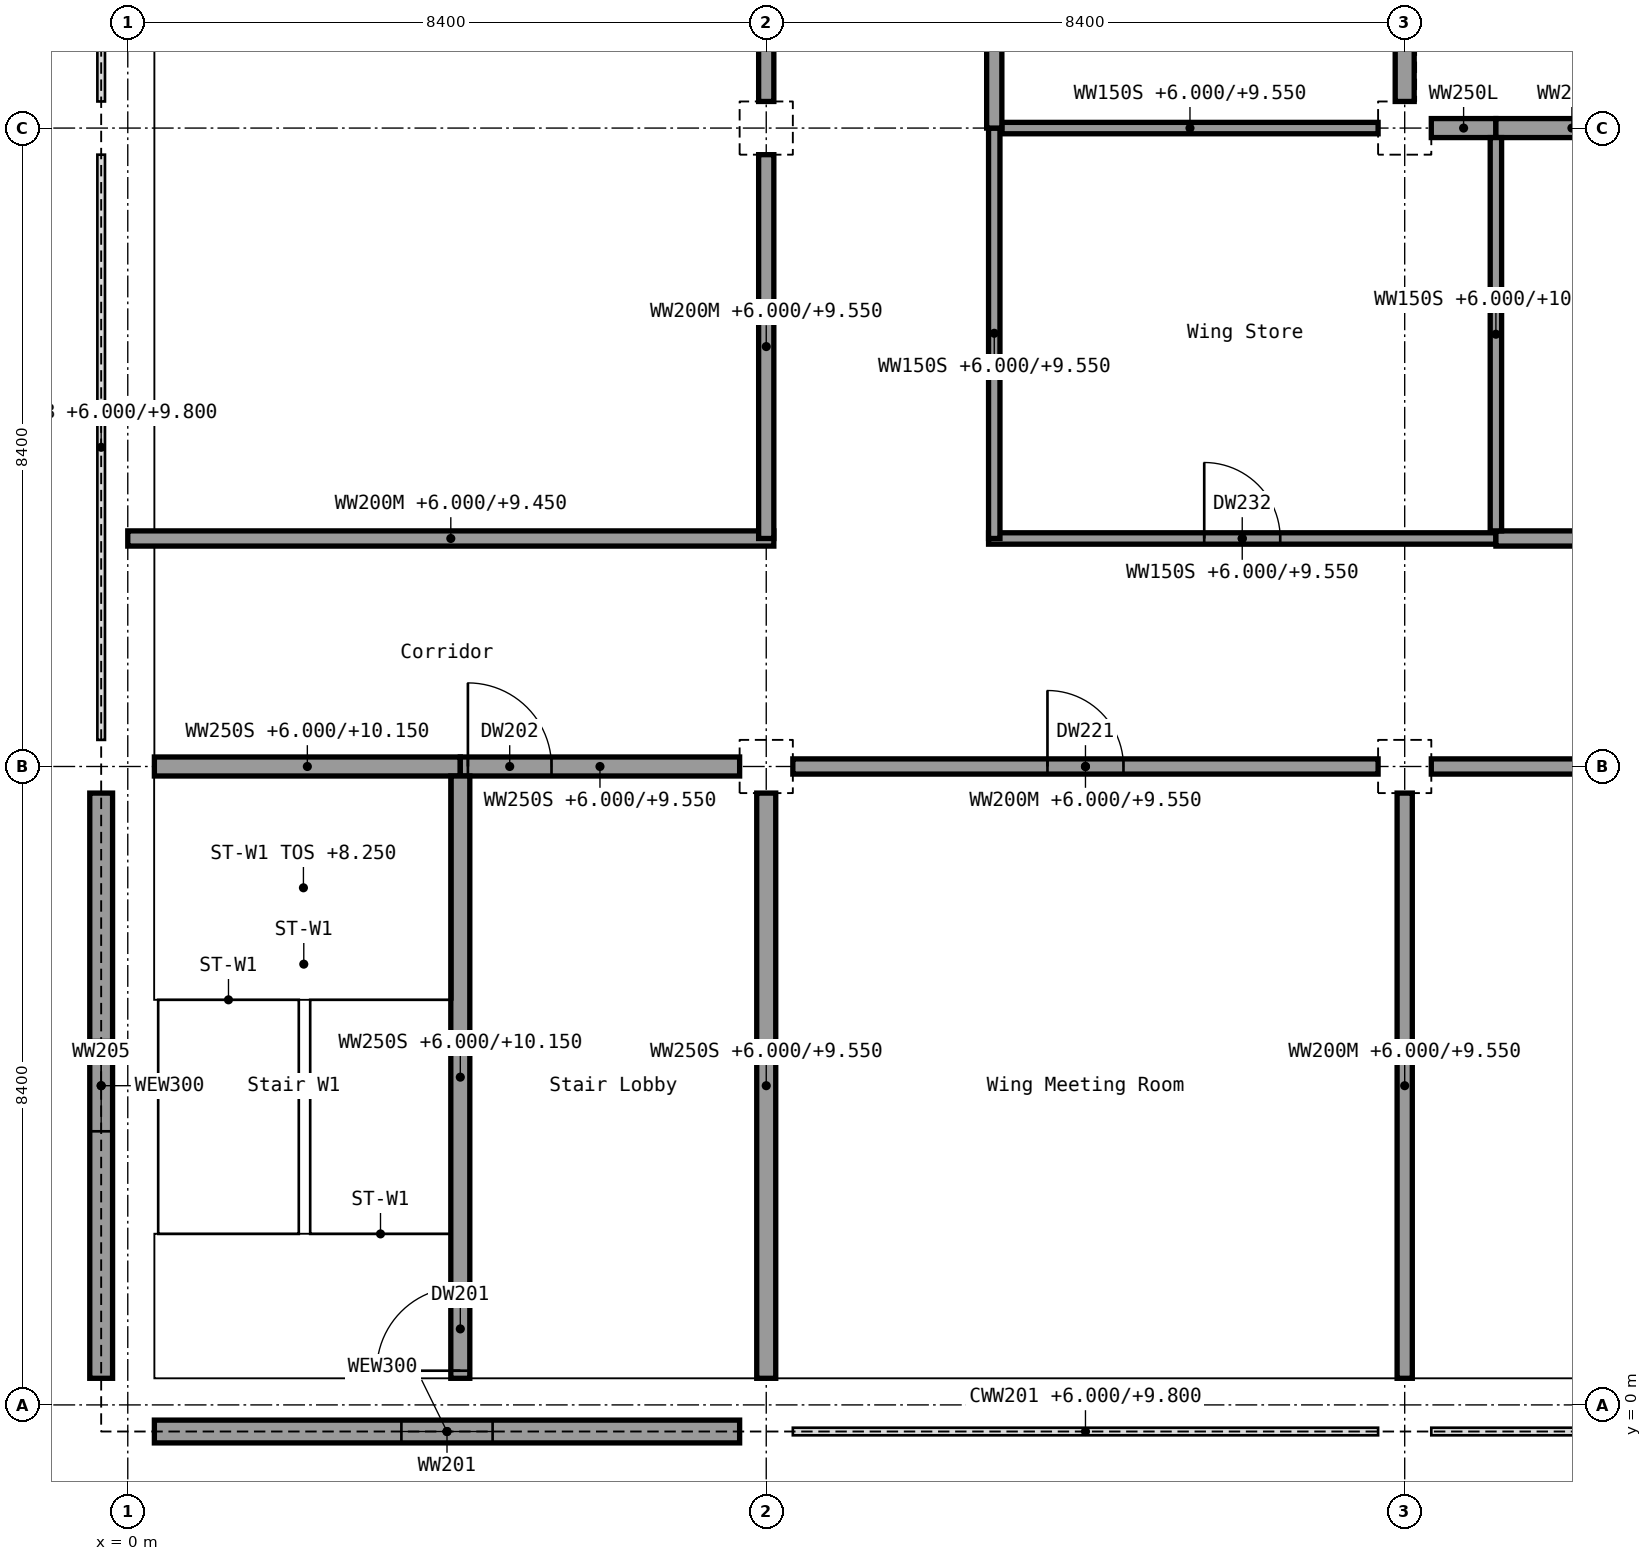
"""IFC4 building model, lengths in metres.
Left out: names, types, materials, properties, quantities, classifications, styles, units other than length and angle.
Written with IfcOpenShell. Run it as: python <this file> out.ifc"""

import sys

from ifc_helpers import new_model, si_unit, direction, frame, frame_2d, origin, origin_2d, place, context, subcontext, project, spatial, rectangle, extrude, element, fill, save


model = new_model("IFC4")
c1 = context("Model", 3, precision=1e-05, world=origin(), true_north=direction((0.0, 1.0)))
c2 = subcontext(c1, "Body", "Model", "MODEL_VIEW")
j1 = project(units=[si_unit("LENGTHUNIT", "METRE"), si_unit("PLANEANGLEUNIT", "RADIAN")], contexts=[c1])
p1 = place(None, origin())
s1 = spatial("IfcSite", under=j1, at=p1, CompositionType="ELEMENT")
p2 = place(p1, origin())
s2 = spatial("IfcBuilding", under=s1, at=p2, CompositionType="ELEMENT")
p3 = place(p2, frame((0.0, 0.0, 6.0)))
s3 = spatial("IfcBuildingStorey", under=s2, at=p3, CompositionType="ELEMENT", Elevation=6.0)
for number, where, z_axis, x_axis in (
    (1, (0.0, 0.0, 0.0), (0.0, 0.0, 1.0), (1.0, 0.0, 0.0)),
    (2, (0.0, 8.4, 0.0), (0.0, 0.0, 1.0), (1.0, 0.0, 0.0)),
    (3, (0.0, 16.8, 0.0), (0.0, 0.0, 1.0), (1.0, 0.0, 0.0)),
    (4, (8.4, 0.0, 0.0), (0.0, 0.0, 1.0), (1.0, 0.0, 0.0)),
    (5, (8.4, 8.4, 0.0), (0.0, 0.0, 1.0), (1.0, 0.0, 0.0)),
    (6, (8.4, 16.8, 0.0), (0.0, 0.0, 1.0), (1.0, 0.0, 0.0)),
    (7, (16.8, 0.0, 0.0), (0.0, 0.0, 1.0), (1.0, 0.0, 0.0)),
    (8, (16.8, 8.4, 0.0), (0.0, 0.0, 1.0), (1.0, 0.0, 0.0)),
    (9, (16.8, 16.8, 0.0), (0.0, 0.0, 1.0), (1.0, 0.0, 0.0)),
):
    element("IfcColumn", number, at=place(p3, frame(where, z_axis=z_axis, x_axis=x_axis)), inside=s3, PredefinedType="COLUMN", context=c2, shape_type="SweptSolid", body=[
        extrude(rectangle(XDim=0.7, YDim=0.7, at=origin_2d()), origin(), (0.0, 0.0, 1.0), 4.5),
    ])
p4 = place(p3, frame((0.35, -0.35, 0.0), z_axis=(0.0, 0.0, 1.0), x_axis=(1.0, 0.0, 0.0)))
e10 = element("IfcWall", 10, at=p4, inside=s3, PredefinedType="SOLIDWALL", context=c2, shape_type="SweptSolid", body=[
    extrude(rectangle(XDim=7.7, YDim=0.3, at=frame_2d((3.85, 0.0))), origin(), (0.0, 0.0, 1.0), 3.8),
])
p5 = place(p4, frame((3.25, 0.0, 1.0)))
e11 = element("IfcOpeningElement", 11, at=p5, cuts=e10, PredefinedType="OPENING", context=c2, shape_type="SweptSolid", body=[
    extrude(rectangle(XDim=1.2, YDim=1.5, at=frame_2d((0.6, 0.75))), frame((0.0, 0.15, 0.0), z_axis=(0.0, -1.0, 0.0), x_axis=(1.0, 0.0, 0.0)), (0.0, 0.0, 1.0), 0.3),
])
p6 = place(p3, frame((-0.35, 0.35, 0.0), z_axis=(0.0, 0.0, 1.0), x_axis=(0.0, 1.0, 0.0)))
e12 = element("IfcWall", 12, at=p6, inside=s3, PredefinedType="SOLIDWALL", context=c2, shape_type="SweptSolid", body=[
    extrude(rectangle(XDim=7.7, YDim=0.3, at=frame_2d((3.85, 0.0))), origin(), (0.0, 0.0, 1.0), 3.8),
])
p7 = place(p6, frame((3.25, 0.0, 1.0)))
e13 = element("IfcOpeningElement", 13, at=p7, cuts=e12, PredefinedType="OPENING", context=c2, shape_type="SweptSolid", body=[
    extrude(rectangle(XDim=1.2, YDim=1.5, at=frame_2d((0.6, 0.75))), frame((0.0, 0.15, 0.0), z_axis=(0.0, -1.0, 0.0), x_axis=(1.0, 0.0, 0.0)), (0.0, 0.0, 1.0), 0.3),
])
p8 = place(p3, frame((0.35, 8.4, 0.0), z_axis=(0.0, 0.0, 1.0), x_axis=(1.0, 0.0, 0.0)))
e14 = element("IfcWall", 14, at=p8, inside=s3, PredefinedType="SHEAR", context=c2, shape_type="SweptSolid", body=[
    extrude(rectangle(XDim=4.025, YDim=0.25, at=frame_2d((2.012, 0.0))), origin(), (0.0, 0.0, 1.0), 4.15),
])
p9 = place(p3, frame((4.375, 8.4, 0.0), z_axis=(0.0, 0.0, 1.0), x_axis=(1.0, 0.0, 0.0)))
e15 = element("IfcWall", 15, at=p9, inside=s3, PredefinedType="SHEAR", context=c2, shape_type="SweptSolid", body=[
    extrude(rectangle(XDim=3.675, YDim=0.25, at=frame_2d((1.837, 0.0))), origin(), (0.0, 0.0, 1.0), 3.55),
])
p10 = place(p9, frame((0.1, 0.0, 0.0)))
e16 = element("IfcOpeningElement", 16, at=p10, cuts=e15, PredefinedType="OPENING", context=c2, shape_type="SweptSolid", body=[
    extrude(rectangle(XDim=1.1, YDim=2.1, at=frame_2d((0.55, 1.05))), frame((0.0, 0.125, 0.0), z_axis=(0.0, -1.0, 0.0), x_axis=(1.0, 0.0, 0.0)), (0.0, 0.0, 1.0), 0.25),
])
p11 = place(p3, frame((8.75, 8.4, 0.0), z_axis=(0.0, 0.0, 1.0), x_axis=(1.0, 0.0, 0.0)))
e17 = element("IfcWall", 17, at=p11, inside=s3, PredefinedType="PARTITIONING", context=c2, shape_type="SweptSolid", body=[
    extrude(rectangle(XDim=7.7, YDim=0.2, at=frame_2d((3.85, 0.0))), origin(), (0.0, 0.0, 1.0), 3.55),
])
p12 = place(p11, frame((3.35, 0.0, 0.0)))
e18 = element("IfcOpeningElement", 18, at=p12, cuts=e17, PredefinedType="OPENING", context=c2, shape_type="SweptSolid", body=[
    extrude(rectangle(XDim=1.0, YDim=2.1, at=frame_2d((0.5, 1.05))), frame((0.0, 0.1, 0.0), z_axis=(0.0, -1.0, 0.0), x_axis=(1.0, 0.0, 0.0)), (0.0, 0.0, 1.0), 0.2),
])
p13 = place(p3, frame((17.15, 8.4, 0.0), z_axis=(0.0, 0.0, 1.0), x_axis=(1.0, 0.0, 0.0)))
e19 = element("IfcWall", 19, at=p13, inside=s3, PredefinedType="PARTITIONING", context=c2, shape_type="SweptSolid", body=[
    extrude(rectangle(XDim=7.7, YDim=0.2, at=frame_2d((3.85, 0.0))), origin(), (0.0, 0.0, 1.0), 3.55),
])
p14 = place(p13, frame((3.35, 0.0, 0.0)))
e20 = element("IfcOpeningElement", 20, at=p14, cuts=e19, PredefinedType="OPENING", context=c2, shape_type="SweptSolid", body=[
    extrude(rectangle(XDim=1.0, YDim=2.1, at=frame_2d((0.5, 1.05))), frame((0.0, 0.1, 0.0), z_axis=(0.0, -1.0, 0.0), x_axis=(1.0, 0.0, 0.0)), (0.0, 0.0, 1.0), 0.2),
])
p15 = place(p3, frame((0.0, 11.4, 0.0), z_axis=(0.0, 0.0, 1.0), x_axis=(1.0, 0.0, 0.0)))
e21 = element("IfcWall", 21, at=p15, inside=s3, PredefinedType="PARTITIONING", context=c2, shape_type="SweptSolid", body=[
    extrude(rectangle(XDim=8.5, YDim=0.2, at=frame_2d((4.25, 0.0))), origin(), (0.0, 0.0, 1.0), 3.45),
])
p16 = place(p3, frame((11.325, 11.4, 0.0), z_axis=(0.0, 0.0, 1.0), x_axis=(1.0, 0.0, 0.0)))
e22 = element("IfcWall", 22, at=p16, inside=s3, PredefinedType="PARTITIONING", context=c2, shape_type="SweptSolid", body=[
    extrude(rectangle(XDim=6.675, YDim=0.15, at=frame_2d((3.337, 0.0))), origin(), (0.0, 0.0, 1.0), 3.55),
])
p17 = place(p16, frame((2.837, 0.0, 0.0)))
e23 = element("IfcOpeningElement", 23, at=p17, cuts=e22, PredefinedType="OPENING", context=c2, shape_type="SweptSolid", body=[
    extrude(rectangle(XDim=1.0, YDim=2.1, at=frame_2d((0.5, 1.05))), frame((0.0, 0.075, 0.0), z_axis=(0.0, -1.0, 0.0), x_axis=(1.0, 0.0, 0.0)), (0.0, 0.0, 1.0), 0.15),
])
p18 = place(p3, frame((18.0, 11.4, 0.0), z_axis=(0.0, 0.0, 1.0), x_axis=(1.0, 0.0, 0.0)))
e24 = element("IfcWall", 24, at=p18, inside=s3, PredefinedType="PARTITIONING", context=c2, shape_type="SweptSolid", body=[
    extrude(rectangle(XDim=12.0, YDim=0.2, at=frame_2d((6.0, 0.0))), origin(), (0.0, 0.0, 1.0), 3.55),
])
p19 = place(p18, frame((5.5, 0.0, 0.0)))
e25 = element("IfcOpeningElement", 25, at=p19, cuts=e24, PredefinedType="OPENING", context=c2, shape_type="SweptSolid", body=[
    extrude(rectangle(XDim=1.0, YDim=2.1, at=frame_2d((0.5, 1.05))), frame((0.0, 0.1, 0.0), z_axis=(0.0, -1.0, 0.0), x_axis=(1.0, 0.0, 0.0)), (0.0, 0.0, 1.0), 0.2),
])
p20 = place(p3, frame((11.5, 16.8, 0.0), z_axis=(0.0, 0.0, 1.0), x_axis=(1.0, 0.0, 0.0)))
e26 = element("IfcWall", 26, at=p20, inside=s3, PredefinedType="PARTITIONING", context=c2, shape_type="SweptSolid", body=[
    extrude(rectangle(XDim=4.95, YDim=0.15, at=frame_2d((2.475, 0.0))), origin(), (0.0, 0.0, 1.0), 3.55),
])
p21 = place(p3, frame((17.15, 16.8, 0.0), z_axis=(0.0, 0.0, 1.0), x_axis=(1.0, 0.0, 0.0)))
e27 = element("IfcWall", 27, at=p21, inside=s3, PredefinedType="SHEAR", context=c2, shape_type="SweptSolid", body=[
    extrude(rectangle(XDim=0.85, YDim=0.25, at=frame_2d((0.425, 0.0))), origin(), (0.0, 0.0, 1.0), 4.15),
])
p22 = place(p3, frame((18.0, 16.8, 0.0), z_axis=(0.0, 0.0, 1.0), x_axis=(1.0, 0.0, 0.0)))
e28 = element("IfcWall", 28, at=p22, inside=s3, PredefinedType="SHEAR", context=c2, shape_type="SweptSolid", body=[
    extrude(rectangle(XDim=2.0, YDim=0.25, at=frame_2d((1.0, 0.0))), origin(), (0.0, 0.0, 1.0), 4.15),
])
p23 = place(p3, frame((4.375, 0.35, 0.0), z_axis=(0.0, 0.0, 1.0), x_axis=(0.0, 1.0, 0.0)))
e29 = element("IfcWall", 29, at=p23, inside=s3, PredefinedType="SHEAR", context=c2, shape_type="SweptSolid", body=[
    extrude(rectangle(XDim=7.925, YDim=0.25, at=frame_2d((3.962, 0.0))), origin(), (0.0, 0.0, 1.0), 4.15),
])
p24 = place(p23, frame((0.1, 0.0, 0.0)))
e30 = element("IfcOpeningElement", 30, at=p24, cuts=e29, PredefinedType="OPENING", context=c2, shape_type="SweptSolid", body=[
    extrude(rectangle(XDim=1.1, YDim=2.1, at=frame_2d((0.55, 1.05))), frame((0.0, 0.125, 0.0), z_axis=(0.0, -1.0, 0.0), x_axis=(1.0, 0.0, 0.0)), (0.0, 0.0, 1.0), 0.25),
])
p25 = place(p3, frame((8.4, 0.35, 0.0), z_axis=(0.0, 0.0, 1.0), x_axis=(0.0, 1.0, 0.0)))
e31 = element("IfcWall", 31, at=p25, inside=s3, PredefinedType="SHEAR", context=c2, shape_type="SweptSolid", body=[
    extrude(rectangle(XDim=7.7, YDim=0.25, at=frame_2d((3.85, 0.0))), origin(), (0.0, 0.0, 1.0), 3.55),
])
p26 = place(p3, frame((8.4, 11.4, 0.0), z_axis=(0.0, 0.0, 1.0), x_axis=(0.0, 1.0, 0.0)))
e32 = element("IfcWall", 32, at=p26, inside=s3, PredefinedType="PARTITIONING", context=c2, shape_type="SweptSolid", body=[
    extrude(rectangle(XDim=5.05, YDim=0.2, at=frame_2d((2.525, 0.0))), origin(), (0.0, 0.0, 1.0), 3.55),
])
p27 = place(p3, frame((8.4, 17.15, 0.0), z_axis=(0.0, 0.0, 1.0), x_axis=(0.0, 1.0, 0.0)))
e33 = element("IfcWall", 33, at=p27, inside=s3, PredefinedType="PARTITIONING", context=c2, shape_type="SweptSolid", body=[
    extrude(rectangle(XDim=7.7, YDim=0.2, at=frame_2d((3.85, 0.0))), origin(), (0.0, 0.0, 1.0), 3.55),
])
p28 = place(p27, frame((3.35, 0.0, 0.0)))
e34 = element("IfcOpeningElement", 34, at=p28, cuts=e33, PredefinedType="OPENING", context=c2, shape_type="SweptSolid", body=[
    extrude(rectangle(XDim=1.0, YDim=2.1, at=frame_2d((0.5, 1.05))), frame((0.0, 0.1, 0.0), z_axis=(0.0, -1.0, 0.0), x_axis=(1.0, 0.0, 0.0)), (0.0, 0.0, 1.0), 0.2),
])
p29 = place(p3, frame((11.4, 11.4, 0.0), z_axis=(0.0, 0.0, 1.0), x_axis=(0.0, 1.0, 0.0)))
e35 = element("IfcWall", 35, at=p29, inside=s3, PredefinedType="PARTITIONING", context=c2, shape_type="SweptSolid", body=[
    extrude(rectangle(XDim=5.4, YDim=0.15, at=frame_2d((2.7, 0.0))), origin(), (0.0, 0.0, 1.0), 3.55),
])
p30 = place(p3, frame((11.4, 16.8, 0.0), z_axis=(0.0, 0.0, 1.0), x_axis=(0.0, 1.0, 0.0)))
e36 = element("IfcWall", 36, at=p30, inside=s3, PredefinedType="PARTITIONING", context=c2, shape_type="SweptSolid", body=[
    extrude(rectangle(XDim=16.8, YDim=0.2, at=frame_2d((8.4, 0.0))), origin(), (0.0, 0.0, 1.0), 3.55),
])
p31 = place(p30, frame((7.5, 0.0, 0.0)))
e37 = element("IfcOpeningElement", 37, at=p31, cuts=e36, PredefinedType="OPENING", context=c2, shape_type="SweptSolid", body=[
    extrude(rectangle(XDim=1.8, YDim=2.1, at=frame_2d((0.9, 1.05))), frame((0.0, 0.1, 0.0), z_axis=(0.0, -1.0, 0.0), x_axis=(1.0, 0.0, 0.0)), (0.0, 0.0, 1.0), 0.2),
])
p32 = place(p3, frame((16.8, 0.35, 0.0), z_axis=(0.0, 0.0, 1.0), x_axis=(0.0, 1.0, 0.0)))
e38 = element("IfcWall", 38, at=p32, inside=s3, PredefinedType="PARTITIONING", context=c2, shape_type="SweptSolid", body=[
    extrude(rectangle(XDim=7.7, YDim=0.2, at=frame_2d((3.85, 0.0))), origin(), (0.0, 0.0, 1.0), 3.55),
])
p33 = place(p3, frame((16.8, 17.15, 0.0), z_axis=(0.0, 0.0, 1.0), x_axis=(0.0, 1.0, 0.0)))
e39 = element("IfcWall", 39, at=p33, inside=s3, PredefinedType="SHEAR", context=c2, shape_type="SweptSolid", body=[
    extrude(rectangle(XDim=2.45, YDim=0.25, at=frame_2d((1.225, 0.0))), origin(), (0.0, 0.0, 1.0), 4.15),
])
p34 = place(p33, frame((0.675, 0.0, 0.0)))
e40 = element("IfcOpeningElement", 40, at=p34, cuts=e39, PredefinedType="OPENING", context=c2, shape_type="SweptSolid", body=[
    extrude(rectangle(XDim=1.1, YDim=2.1, at=frame_2d((0.55, 1.05))), frame((0.0, 0.125, 0.0), z_axis=(0.0, -1.0, 0.0), x_axis=(1.0, 0.0, 0.0)), (0.0, 0.0, 1.0), 0.25),
])
p35 = place(p3, frame((18.0, 11.5, 0.0), z_axis=(0.0, 0.0, 1.0), x_axis=(0.0, 1.0, 0.0)))
e41 = element("IfcWall", 41, at=p35, inside=s3, PredefinedType="PARTITIONING", context=c2, shape_type="SweptSolid", body=[
    extrude(rectangle(XDim=5.175, YDim=0.15, at=frame_2d((2.587, 0.0))), origin(), (0.0, 0.0, 1.0), 4.15),
])
p36 = place(p5, origin())
e42 = element("IfcWindow", 42, at=p36, inside=s3, PartitioningType="SINGLE_PANEL", PredefinedType="WINDOW", context=c2, shape_type="SweptSolid", body=[
    extrude(rectangle(XDim=1.2, YDim=1.5, at=frame_2d((0.6, 0.75))), frame((0.0, 0.03, 0.0), z_axis=(0.0, -1.0, 0.0), x_axis=(1.0, 0.0, 0.0)), (0.0, 0.0, 1.0), 0.06),
])
fill(e11, e42)
p37 = place(p7, origin())
e43 = element("IfcWindow", 43, at=p37, inside=s3, PartitioningType="SINGLE_PANEL", PredefinedType="WINDOW", context=c2, shape_type="SweptSolid", body=[
    extrude(rectangle(XDim=1.2, YDim=1.5, at=frame_2d((0.6, 0.75))), frame((0.0, 0.03, 0.0), z_axis=(0.0, -1.0, 0.0), x_axis=(1.0, 0.0, 0.0)), (0.0, 0.0, 1.0), 0.06),
])
fill(e13, e43)
p38 = place(p24, origin())
e44 = element("IfcDoor", 44, at=p38, inside=s3, OperationType="SINGLE_SWING_LEFT", PredefinedType="DOOR", context=c2, shape_type="SweptSolid", body=[
    extrude(rectangle(XDim=1.1, YDim=2.1, at=frame_2d((0.55, 1.05))), frame((0.0, 0.025, 0.0), z_axis=(0.0, -1.0, 0.0), x_axis=(1.0, 0.0, 0.0)), (0.0, 0.0, 1.0), 0.05),
])
fill(e30, e44)
p39 = place(p10, origin())
e45 = element("IfcDoor", 45, at=p39, inside=s3, OperationType="SINGLE_SWING_LEFT", PredefinedType="DOOR", context=c2, shape_type="SweptSolid", body=[
    extrude(rectangle(XDim=1.1, YDim=2.1, at=frame_2d((0.55, 1.05))), frame((0.0, 0.025, 0.0), z_axis=(0.0, -1.0, 0.0), x_axis=(1.0, 0.0, 0.0)), (0.0, 0.0, 1.0), 0.05),
])
fill(e16, e45)
p40 = place(p12, origin())
e46 = element("IfcDoor", 46, at=p40, inside=s3, OperationType="SINGLE_SWING_LEFT", PredefinedType="DOOR", context=c2, shape_type="SweptSolid", body=[
    extrude(rectangle(XDim=1.0, YDim=2.1, at=frame_2d((0.5, 1.05))), frame((0.0, 0.025, 0.0), z_axis=(0.0, -1.0, 0.0), x_axis=(1.0, 0.0, 0.0)), (0.0, 0.0, 1.0), 0.05),
])
fill(e18, e46)
p41 = place(p17, origin())
e47 = element("IfcDoor", 47, at=p41, inside=s3, OperationType="SINGLE_SWING_LEFT", PredefinedType="DOOR", context=c2, shape_type="SweptSolid", body=[
    extrude(rectangle(XDim=1.0, YDim=2.1, at=frame_2d((0.5, 1.05))), frame((0.0, 0.025, 0.0), z_axis=(0.0, -1.0, 0.0), x_axis=(1.0, 0.0, 0.0)), (0.0, 0.0, 1.0), 0.05),
])
fill(e23, e47)
save(model, sys.argv[1])
